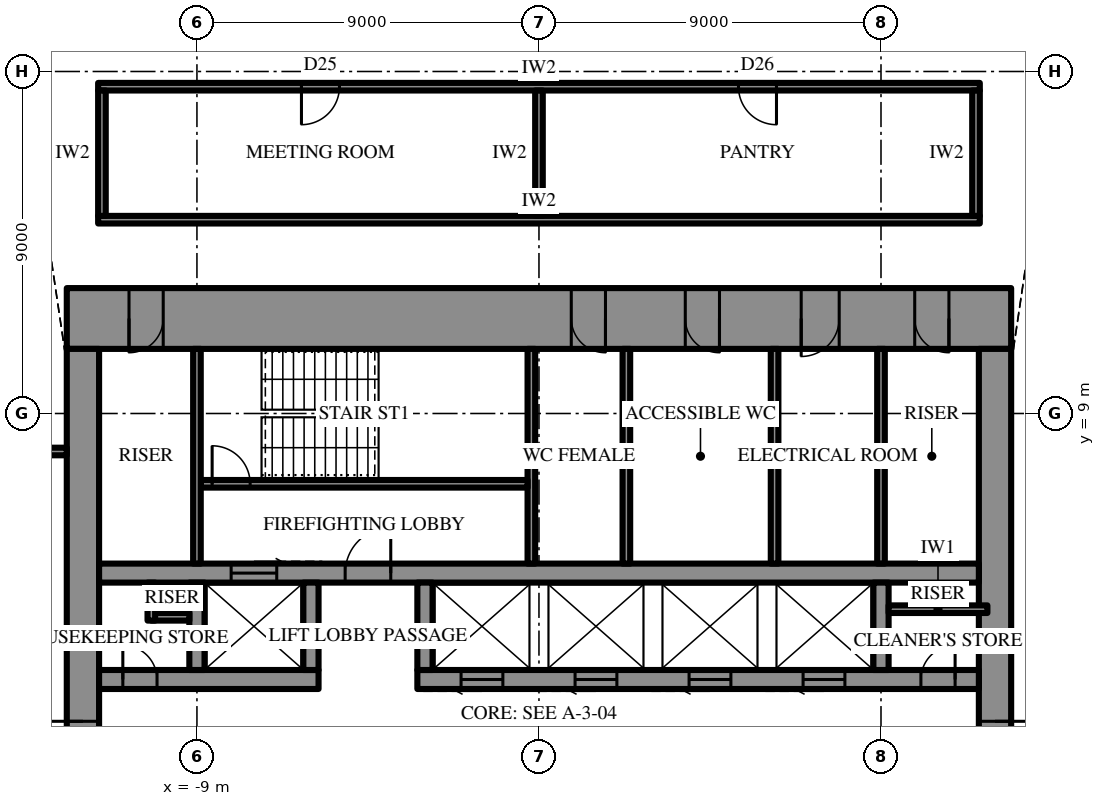
"""IFC4 building model, lengths in metres.
Left out: names, types, materials, properties, quantities, classifications, styles, units other than length and angle.
Written with IfcOpenShell. Run it as: python <this file> out.ifc"""

import sys

from ifc_helpers import new_model, si_unit, direction, frame, frame_2d, origin, place, context, subcontext, project, spatial, rectangle, extrude, element, fill, save


model = new_model("IFC4")
c1 = context("Model", 3, precision=1e-05, world=origin(), true_north=direction((0.0, 1.0)))
c2 = subcontext(c1, "Body", "Model", "MODEL_VIEW")
j1 = project(units=[si_unit("LENGTHUNIT", "METRE"), si_unit("PLANEANGLEUNIT", "RADIAN")], contexts=[c1])
p1 = place(None, origin())
s1 = spatial("IfcSite", under=j1, at=p1, CompositionType="ELEMENT")
p2 = place(p1, origin())
s2 = spatial("IfcBuilding", under=s1, at=p2, CompositionType="ELEMENT")
p3 = place(p2, frame((0.0, 0.0, 349.3)))
s3 = spatial("IfcBuildingStorey", under=s2, at=p3, CompositionType="ELEMENT", Elevation=349.3)
p4 = place(p3, frame((-12.425, 11.5, 0.0), z_axis=(0.0, 0.0, 1.0), x_axis=(1.0, 0.0, 0.0)))
e1 = element("IfcWall", 1, at=p4, inside=s3, PredefinedType="SHEAR", context=c2, shape_type="SweptSolid", body=[
    extrude(rectangle(XDim=24.85, YDim=1.6, at=frame_2d((12.425, 0.0))), origin(), (0.0, 0.0, 1.0), 4.2),
])
p5 = place(p4, frame((13.275, 0.0, 0.0)))
e2 = element("IfcOpeningElement", 2, at=p5, cuts=e1, PredefinedType="OPENING", context=c2, shape_type="SweptSolid", body=[
    extrude(rectangle(XDim=0.9, YDim=2.2, at=frame_2d((0.45, 1.1))), frame((0.0, 0.81, 0.0), z_axis=(0.0, -1.0, 0.0), x_axis=(1.0, 0.0, 0.0)), (0.0, 0.0, 1.0), 1.62),
])
p6 = place(p4, frame((16.275, 0.0, 0.0)))
e3 = element("IfcOpeningElement", 3, at=p6, cuts=e1, PredefinedType="OPENING", context=c2, shape_type="SweptSolid", body=[
    extrude(rectangle(XDim=0.9, YDim=2.2, at=frame_2d((0.45, 1.1))), frame((0.0, 0.81, 0.0), z_axis=(0.0, -1.0, 0.0), x_axis=(1.0, 0.0, 0.0)), (0.0, 0.0, 1.0), 1.62),
])
p7 = place(p4, frame((19.325, 0.0, 0.0)))
e4 = element("IfcOpeningElement", 4, at=p7, cuts=e1, PredefinedType="OPENING", context=c2, shape_type="SweptSolid", body=[
    extrude(rectangle(XDim=1.0, YDim=2.2, at=frame_2d((0.5, 1.1))), frame((0.0, 0.81, 0.0), z_axis=(0.0, -1.0, 0.0), x_axis=(1.0, 0.0, 0.0)), (0.0, 0.0, 1.0), 1.62),
])
p8 = place(p4, frame((1.637, 0.0, 0.0)))
e5 = element("IfcOpeningElement", 5, at=p8, cuts=e1, PredefinedType="OPENING", context=c2, shape_type="SweptSolid", body=[
    extrude(rectangle(XDim=0.9, YDim=2.2, at=frame_2d((0.45, 1.1))), frame((0.0, 0.81, 0.0), z_axis=(0.0, -1.0, 0.0), x_axis=(1.0, 0.0, 0.0)), (0.0, 0.0, 1.0), 1.62),
])
p9 = place(p4, frame((22.312, 0.0, 0.0)))
e6 = element("IfcOpeningElement", 6, at=p9, cuts=e1, PredefinedType="OPENING", context=c2, shape_type="SweptSolid", body=[
    extrude(rectangle(XDim=0.9, YDim=2.2, at=frame_2d((0.45, 1.1))), frame((0.0, 0.81, 0.0), z_axis=(0.0, -1.0, 0.0), x_axis=(1.0, 0.0, 0.0)), (0.0, 0.0, 1.0), 1.62),
])
p10 = place(p3, frame((12.0, -10.7, 0.0), z_axis=(0.0, 0.0, 1.0), x_axis=(0.0, 1.0, 0.0)))
e7 = element("IfcWall", 7, at=p10, inside=s3, PredefinedType="SHEAR", context=c2, shape_type="SweptSolid", body=[
    extrude(rectangle(XDim=21.4, YDim=0.85, at=frame_2d((10.7, 0.0))), origin(), (0.0, 0.0, 1.0), 4.2),
])
p11 = place(p10, frame((9.8, 0.0, 0.0)))
e8 = element("IfcOpeningElement", 8, at=p11, cuts=e7, PredefinedType="OPENING", context=c2, shape_type="SweptSolid", body=[
    extrude(rectangle(XDim=1.8, YDim=2.4, at=frame_2d((0.9, 1.2))), frame((0.0, 0.435, 0.0), z_axis=(0.0, -1.0, 0.0), x_axis=(1.0, 0.0, 0.0)), (0.0, 0.0, 1.0), 0.87),
])
p12 = place(p3, frame((-12.0, 10.7, 0.0), z_axis=(0.0, 0.0, 1.0), x_axis=(0.0, -1.0, 0.0)))
e9 = element("IfcWall", 9, at=p12, inside=s3, PredefinedType="SHEAR", context=c2, shape_type="SweptSolid", body=[
    extrude(rectangle(XDim=21.4, YDim=0.85, at=frame_2d((10.7, 0.0))), origin(), (0.0, 0.0, 1.0), 4.2),
])
p13 = place(p12, frame((9.8, 0.0, 0.0)))
e10 = element("IfcOpeningElement", 10, at=p13, cuts=e9, PredefinedType="OPENING", context=c2, shape_type="SweptSolid", body=[
    extrude(rectangle(XDim=1.8, YDim=2.4, at=frame_2d((0.9, 1.2))), frame((0.0, 0.435, 0.0), z_axis=(0.0, -1.0, 0.0), x_axis=(1.0, 0.0, 0.0)), (0.0, 0.0, 1.0), 0.87),
])
p14 = place(p3, frame((-11.575, 2.0, 0.0), z_axis=(0.0, 0.0, 1.0), x_axis=(1.0, 0.0, 0.0)))
e11 = element("IfcWall", 11, at=p14, inside=s3, PredefinedType="SHEAR", context=c2, shape_type="SweptSolid", body=[
    extrude(rectangle(XDim=5.775, YDim=0.5, at=frame_2d((2.887, 0.0))), origin(), (0.0, 0.0, 1.0), 4.2),
])
p15 = place(p14, frame((0.625, 0.0, 0.0)))
e12 = element("IfcOpeningElement", 12, at=p15, cuts=e11, PredefinedType="OPENING", context=c2, shape_type="SweptSolid", body=[
    extrude(rectangle(XDim=0.9, YDim=2.2, at=frame_2d((0.45, 1.1))), frame((0.0, 0.26, 0.0), z_axis=(0.0, -1.0, 0.0), x_axis=(1.0, 0.0, 0.0)), (0.0, 0.0, 1.0), 0.52),
])
p16 = place(p3, frame((-3.2, 2.0, 0.0), z_axis=(0.0, 0.0, 1.0), x_axis=(1.0, 0.0, 0.0)))
e13 = element("IfcWall", 13, at=p16, inside=s3, PredefinedType="SHEAR", context=c2, shape_type="SweptSolid", body=[
    extrude(rectangle(XDim=14.775, YDim=0.5, at=frame_2d((7.387, 0.0))), origin(), (0.0, 0.0, 1.0), 4.2),
])
p17 = place(p16, frame((13.25, 0.0, 0.0)))
e14 = element("IfcOpeningElement", 14, at=p17, cuts=e13, PredefinedType="OPENING", context=c2, shape_type="SweptSolid", body=[
    extrude(rectangle(XDim=0.9, YDim=2.2, at=frame_2d((0.45, 1.1))), frame((0.0, 0.26, 0.0), z_axis=(0.0, -1.0, 0.0), x_axis=(1.0, 0.0, 0.0)), (0.0, 0.0, 1.0), 0.52),
])
p18 = place(p16, frame((1.15, 0.0, 0.0)))
e15 = element("IfcOpeningElement", 15, at=p18, cuts=e13, PredefinedType="OPENING", context=c2, shape_type="SweptSolid", body=[
    extrude(rectangle(XDim=1.1, YDim=2.2, at=frame_2d((0.55, 1.1))), frame((0.0, 0.26, 0.0), z_axis=(0.0, -1.0, 0.0), x_axis=(1.0, 0.0, 0.0)), (0.0, 0.0, 1.0), 0.52),
])
p19 = place(p16, frame((4.15, 0.0, 0.0)))
e16 = element("IfcOpeningElement", 16, at=p19, cuts=e13, PredefinedType="OPENING", context=c2, shape_type="SweptSolid", body=[
    extrude(rectangle(XDim=1.1, YDim=2.2, at=frame_2d((0.55, 1.1))), frame((0.0, 0.26, 0.0), z_axis=(0.0, -1.0, 0.0), x_axis=(1.0, 0.0, 0.0)), (0.0, 0.0, 1.0), 0.52),
])
p20 = place(p16, frame((7.15, 0.0, 0.0)))
e17 = element("IfcOpeningElement", 17, at=p20, cuts=e13, PredefinedType="OPENING", context=c2, shape_type="SweptSolid", body=[
    extrude(rectangle(XDim=1.1, YDim=2.2, at=frame_2d((0.55, 1.1))), frame((0.0, 0.26, 0.0), z_axis=(0.0, -1.0, 0.0), x_axis=(1.0, 0.0, 0.0)), (0.0, 0.0, 1.0), 0.52),
])
p21 = place(p16, frame((10.15, 0.0, 0.0)))
e18 = element("IfcOpeningElement", 18, at=p21, cuts=e13, PredefinedType="OPENING", context=c2, shape_type="SweptSolid", body=[
    extrude(rectangle(XDim=1.1, YDim=2.2, at=frame_2d((0.55, 1.1))), frame((0.0, 0.26, 0.0), z_axis=(0.0, -1.0, 0.0), x_axis=(1.0, 0.0, 0.0)), (0.0, 0.0, 1.0), 0.52),
])
p22 = place(p3, frame((-11.575, 4.8, 0.0), z_axis=(0.0, 0.0, 1.0), x_axis=(1.0, 0.0, 0.0)))
e19 = element("IfcWall", 19, at=p22, inside=s3, PredefinedType="SHEAR", context=c2, shape_type="SweptSolid", body=[
    extrude(rectangle(XDim=23.15, YDim=0.5, at=frame_2d((11.575, 0.0))), origin(), (0.0, 0.0, 1.0), 4.2),
])
p23 = place(p22, frame((6.475, 0.0, 0.0)))
e20 = element("IfcOpeningElement", 20, at=p23, cuts=e19, PredefinedType="OPENING", context=c2, shape_type="SweptSolid", body=[
    extrude(rectangle(XDim=1.2, YDim=2.2, at=frame_2d((0.6, 1.1))), frame((0.0, 0.26, 0.0), z_axis=(0.0, -1.0, 0.0), x_axis=(1.0, 0.0, 0.0)), (0.0, 0.0, 1.0), 0.52),
])
p24 = place(p22, frame((3.475, 0.0, 0.0)))
e21 = element("IfcOpeningElement", 21, at=p24, cuts=e19, PredefinedType="OPENING", context=c2, shape_type="SweptSolid", body=[
    extrude(rectangle(XDim=1.2, YDim=2.2, at=frame_2d((0.6, 1.1))), frame((0.0, 0.26, 0.0), z_axis=(0.0, -1.0, 0.0), x_axis=(1.0, 0.0, 0.0)), (0.0, 0.0, 1.0), 0.52),
])
for number, where, z_axis, x_axis in (
    (22, (-9.0, 2.25, 0.0), (0.0, 0.0, 1.0), (0.0, 1.0, 0.0)),
    (23, (-6.0, 2.25, 0.0), (0.0, 0.0, 1.0), (0.0, 1.0, 0.0)),
    (24, (-3.0, 2.25, 0.0), (0.0, 0.0, 1.0), (0.0, 1.0, 0.0)),
    (25, (9.0, 2.25, 0.0), (0.0, 0.0, 1.0), (0.0, 1.0, 0.0)),
):
    element("IfcWall", number, at=place(p3, frame(where, z_axis=z_axis, x_axis=x_axis)), inside=s3, PredefinedType="SHEAR", context=c2, shape_type="SweptSolid", body=[
        extrude(rectangle(XDim=2.3, YDim=0.4, at=frame_2d((1.15, 0.0))), origin(), (0.0, 0.0, 1.0), 4.2),
    ])
p25 = place(p3, frame((-0.2, 5.05, 0.0), z_axis=(0.0, 0.0, 1.0), x_axis=(0.0, 1.0, 0.0)))
e26 = element("IfcWall", 26, at=p25, inside=s3, PredefinedType="SHEAR", context=c2, shape_type="SweptSolid", body=[
    extrude(rectangle(XDim=5.65, YDim=0.2, at=frame_2d((2.825, 0.0))), origin(), (0.0, 0.0, 1.0), 4.2),
])
p26 = place(p3, frame((-8.9, 7.15, 0.0), z_axis=(0.0, 0.0, 1.0), x_axis=(1.0, 0.0, 0.0)))
e27 = element("IfcWall", 27, at=p26, inside=s3, PredefinedType="SHEAR", context=c2, shape_type="SweptSolid", body=[
    extrude(rectangle(XDim=8.6, YDim=0.2, at=frame_2d((4.3, 0.0))), origin(), (0.0, 0.0, 1.0), 4.2),
])
p27 = place(p26, frame((0.3, 0.0, 0.0)))
e28 = element("IfcOpeningElement", 28, at=p27, cuts=e27, PredefinedType="OPENING", context=c2, shape_type="SweptSolid", body=[
    extrude(rectangle(XDim=1.0, YDim=2.2, at=frame_2d((0.5, 1.1))), frame((0.0, 0.11, 0.0), z_axis=(0.0, -1.0, 0.0), x_axis=(1.0, 0.0, 0.0)), (0.0, 0.0, 1.0), 0.22),
])
for number, where, z_axis, x_axis in (
    (29, (-9.0, 5.05, 0.0), (0.0, 0.0, 1.0), (0.0, 1.0, 0.0)),
    (30, (9.0, 5.05, 0.0), (0.0, 0.0, 1.0), (0.0, 1.0, 0.0)),
    (31, (2.3, 5.05, 0.0), (0.0, 0.0, 1.0), (0.0, 1.0, 0.0)),
    (32, (6.2, 5.05, 0.0), (0.0, 0.0, 1.0), (0.0, 1.0, 0.0)),
):
    element("IfcWall", number, at=place(p3, frame(where, z_axis=z_axis, x_axis=x_axis)), inside=s3, PredefinedType="PARTITIONING", context=c2, shape_type="SweptSolid", body=[
        extrude(rectangle(XDim=5.65, YDim=0.2, at=frame_2d((2.825, 0.0))), origin(), (0.0, 0.0, 1.0), 4.0),
    ])
for number, where, z_axis, x_axis in (
    (33, (-10.2, 3.65, 0.0), (0.0, 0.0, 1.0), (1.0, 0.0, 0.0)),
    (34, (-10.2, 3.55, 0.0), (0.0, 0.0, 1.0), (0.0, 1.0, 0.0)),
):
    element("IfcWall", number, at=place(p3, frame(where, z_axis=z_axis, x_axis=x_axis)), inside=s3, PredefinedType="PARTITIONING", context=c2, shape_type="SweptSolid", body=[
        extrude(rectangle(XDim=1.0, YDim=0.2, at=frame_2d((0.5, 0.0))), origin(), (0.0, 0.0, 1.0), 4.0),
    ])
p28 = place(p3, frame((9.2, 3.85, 0.0), z_axis=(0.0, 0.0, 1.0), x_axis=(1.0, 0.0, 0.0)))
e35 = element("IfcWall", 35, at=p28, inside=s3, PredefinedType="PARTITIONING", context=c2, shape_type="SweptSolid", body=[
    extrude(rectangle(XDim=2.6, YDim=0.2, at=frame_2d((1.3, 0.0))), origin(), (0.0, 0.0, 1.0), 4.0),
])
p29 = place(p3, frame((-11.6, 14.1, 0.0), z_axis=(0.0, 0.0, 1.0), x_axis=(1.0, 0.0, 0.0)))
e36 = element("IfcWall", 36, at=p29, inside=s3, PredefinedType="PARTITIONING", context=c2, shape_type="SweptSolid", body=[
    extrude(rectangle(XDim=23.2, YDim=0.2, at=frame_2d((11.6, 0.0))), origin(), (0.0, 0.0, 1.0), 4.0),
])
p30 = place(p3, frame((-11.6, 17.6, 0.0), z_axis=(0.0, 0.0, 1.0), x_axis=(1.0, 0.0, 0.0)))
e37 = element("IfcWall", 37, at=p30, inside=s3, PredefinedType="PARTITIONING", context=c2, shape_type="SweptSolid", body=[
    extrude(rectangle(XDim=23.2, YDim=0.2, at=frame_2d((11.6, 0.0))), origin(), (0.0, 0.0, 1.0), 4.0),
])
p31 = place(p30, frame((5.35, 0.0, 0.0)))
e38 = element("IfcOpeningElement", 38, at=p31, cuts=e37, PredefinedType="OPENING", context=c2, shape_type="SweptSolid", body=[
    extrude(rectangle(XDim=1.0, YDim=2.2, at=frame_2d((0.5, 1.1))), frame((0.0, 0.11, 0.0), z_axis=(0.0, -1.0, 0.0), x_axis=(1.0, 0.0, 0.0)), (0.0, 0.0, 1.0), 0.22),
])
p32 = place(p30, frame((16.85, 0.0, 0.0)))
e39 = element("IfcOpeningElement", 39, at=p32, cuts=e37, PredefinedType="OPENING", context=c2, shape_type="SweptSolid", body=[
    extrude(rectangle(XDim=1.0, YDim=2.2, at=frame_2d((0.5, 1.1))), frame((0.0, 0.11, 0.0), z_axis=(0.0, -1.0, 0.0), x_axis=(1.0, 0.0, 0.0)), (0.0, 0.0, 1.0), 0.22),
])
p33 = place(p3, frame((-11.5, 14.2, 0.0), z_axis=(0.0, 0.0, 1.0), x_axis=(0.0, 1.0, 0.0)))
e40 = element("IfcWall", 40, at=p33, inside=s3, PredefinedType="PARTITIONING", context=c2, shape_type="SweptSolid", body=[
    extrude(rectangle(XDim=3.3, YDim=0.2, at=frame_2d((1.65, 0.0))), origin(), (0.0, 0.0, 1.0), 4.0),
])
p34 = place(p3, frame((0.0, 14.2, 0.0), z_axis=(0.0, 0.0, 1.0), x_axis=(0.0, 1.0, 0.0)))
e41 = element("IfcWall", 41, at=p34, inside=s3, PredefinedType="PARTITIONING", context=c2, shape_type="SweptSolid", body=[
    extrude(rectangle(XDim=3.3, YDim=0.2, at=frame_2d((1.65, 0.0))), origin(), (0.0, 0.0, 1.0), 2.992),
])
p35 = place(p3, frame((11.5, 14.2, 0.0), z_axis=(0.0, 0.0, 1.0), x_axis=(0.0, 1.0, 0.0)))
e42 = element("IfcWall", 42, at=p35, inside=s3, PredefinedType="PARTITIONING", context=c2, shape_type="SweptSolid", body=[
    extrude(rectangle(XDim=3.3, YDim=0.2, at=frame_2d((1.65, 0.0))), origin(), (0.0, 0.0, 1.0), 4.0),
])
p36 = place(p3, frame((-12.425, 8.0, 0.0), z_axis=(0.0, 0.0, 1.0), x_axis=(-1.0, 0.0, 0.0)))
e43 = element("IfcWall", 43, at=p36, inside=s3, PredefinedType="PARTITIONING", context=c2, shape_type="SweptSolid", body=[
    extrude(rectangle(XDim=13.59, YDim=0.2, at=frame_2d((6.795, 0.0))), origin(), (0.0, 0.0, 1.0), 4.0),
])
p37 = place(p36, frame((0.859, 0.0, 0.0)))
e44 = element("IfcOpeningElement", 44, at=p37, cuts=e43, PredefinedType="OPENING", context=c2, shape_type="SweptSolid", body=[
    extrude(rectangle(XDim=1.0, YDim=2.2, at=frame_2d((0.5, 1.1))), frame((0.0, 0.11, 0.0), z_axis=(0.0, -1.0, 0.0), x_axis=(1.0, 0.0, 0.0)), (0.0, 0.0, 1.0), 0.22),
])
p38 = place(p11, frame((1.8, 0.0, 0.0), z_axis=(0.0, 0.0, 1.0), x_axis=(-1.0, 0.0, 0.0)))
e45 = element("IfcDoor", 45, at=p38, inside=s3, OperationType="DOUBLE_DOOR_SINGLE_SWING", PredefinedType="DOOR", context=c2, shape_type="SweptSolid", body=[
    extrude(rectangle(XDim=1.8, YDim=2.4, at=frame_2d((0.9, 1.2))), frame((0.0, 0.025, 0.0), z_axis=(0.0, -1.0, 0.0), x_axis=(1.0, 0.0, 0.0)), (0.0, 0.0, 1.0), 0.05),
])
fill(e8, e45)
p39 = place(p13, frame((1.8, 0.0, 0.0), z_axis=(0.0, 0.0, 1.0), x_axis=(-1.0, 0.0, 0.0)))
e46 = element("IfcDoor", 46, at=p39, inside=s3, OperationType="DOUBLE_DOOR_SINGLE_SWING", PredefinedType="DOOR", context=c2, shape_type="SweptSolid", body=[
    extrude(rectangle(XDim=1.8, YDim=2.4, at=frame_2d((0.9, 1.2))), frame((0.0, 0.025, 0.0), z_axis=(0.0, -1.0, 0.0), x_axis=(1.0, 0.0, 0.0)), (0.0, 0.0, 1.0), 0.05),
])
fill(e10, e46)
p40 = place(p23, origin())
e47 = element("IfcDoor", 47, at=p40, inside=s3, OperationType="SINGLE_SWING_LEFT", PredefinedType="DOOR", context=c2, shape_type="SweptSolid", body=[
    extrude(rectangle(XDim=1.2, YDim=2.2, at=frame_2d((0.6, 1.1))), frame((0.0, 0.025, 0.0), z_axis=(0.0, -1.0, 0.0), x_axis=(1.0, 0.0, 0.0)), (0.0, 0.0, 1.0), 0.05),
])
fill(e20, e47)
p41 = place(p27, origin())
e48 = element("IfcDoor", 48, at=p41, inside=s3, OperationType="SINGLE_SWING_RIGHT", PredefinedType="DOOR", context=c2, shape_type="SweptSolid", body=[
    extrude(rectangle(XDim=1.0, YDim=2.2, at=frame_2d((0.5, 1.1))), frame((0.0, 0.025, 0.0), z_axis=(0.0, -1.0, 0.0), x_axis=(1.0, 0.0, 0.0)), (0.0, 0.0, 1.0), 0.05),
])
fill(e28, e48)
p42 = place(p5, frame((0.9, 0.0, 0.0), z_axis=(0.0, 0.0, 1.0), x_axis=(-1.0, 0.0, 0.0)))
e49 = element("IfcDoor", 49, at=p42, inside=s3, OperationType="SINGLE_SWING_RIGHT", PredefinedType="DOOR", context=c2, shape_type="SweptSolid", body=[
    extrude(rectangle(XDim=0.9, YDim=2.2, at=frame_2d((0.45, 1.1))), frame((0.0, 0.025, 0.0), z_axis=(0.0, -1.0, 0.0), x_axis=(1.0, 0.0, 0.0)), (0.0, 0.0, 1.0), 0.05),
])
fill(e2, e49)
p43 = place(p6, frame((0.9, 0.0, 0.0), z_axis=(0.0, 0.0, 1.0), x_axis=(-1.0, 0.0, 0.0)))
e50 = element("IfcDoor", 50, at=p43, inside=s3, OperationType="SINGLE_SWING_RIGHT", PredefinedType="DOOR", context=c2, shape_type="SweptSolid", body=[
    extrude(rectangle(XDim=0.9, YDim=2.2, at=frame_2d((0.45, 1.1))), frame((0.0, 0.025, 0.0), z_axis=(0.0, -1.0, 0.0), x_axis=(1.0, 0.0, 0.0)), (0.0, 0.0, 1.0), 0.05),
])
fill(e3, e50)
p44 = place(p7, frame((1.0, 0.0, 0.0), z_axis=(0.0, 0.0, 1.0), x_axis=(-1.0, 0.0, 0.0)))
e51 = element("IfcDoor", 51, at=p44, inside=s3, OperationType="SINGLE_SWING_LEFT", PredefinedType="DOOR", context=c2, shape_type="SweptSolid", body=[
    extrude(rectangle(XDim=1.0, YDim=2.2, at=frame_2d((0.5, 1.1))), frame((0.0, 0.025, 0.0), z_axis=(0.0, -1.0, 0.0), x_axis=(1.0, 0.0, 0.0)), (0.0, 0.0, 1.0), 0.05),
])
fill(e4, e51)
p45 = place(p8, frame((0.9, 0.0, 0.0), z_axis=(0.0, 0.0, 1.0), x_axis=(-1.0, 0.0, 0.0)))
e52 = element("IfcDoor", 52, at=p45, inside=s3, OperationType="SINGLE_SWING_LEFT", PredefinedType="DOOR", context=c2, shape_type="SweptSolid", body=[
    extrude(rectangle(XDim=0.9, YDim=2.2, at=frame_2d((0.45, 1.1))), frame((0.0, 0.025, 0.0), z_axis=(0.0, -1.0, 0.0), x_axis=(1.0, 0.0, 0.0)), (0.0, 0.0, 1.0), 0.05),
])
fill(e5, e52)
p46 = place(p9, frame((0.9, 0.0, 0.0), z_axis=(0.0, 0.0, 1.0), x_axis=(-1.0, 0.0, 0.0)))
e53 = element("IfcDoor", 53, at=p46, inside=s3, OperationType="SINGLE_SWING_RIGHT", PredefinedType="DOOR", context=c2, shape_type="SweptSolid", body=[
    extrude(rectangle(XDim=0.9, YDim=2.2, at=frame_2d((0.45, 1.1))), frame((0.0, 0.025, 0.0), z_axis=(0.0, -1.0, 0.0), x_axis=(1.0, 0.0, 0.0)), (0.0, 0.0, 1.0), 0.05),
])
fill(e6, e53)
p47 = place(p15, origin())
e54 = element("IfcDoor", 54, at=p47, inside=s3, OperationType="SINGLE_SWING_RIGHT", PredefinedType="DOOR", context=c2, shape_type="SweptSolid", body=[
    extrude(rectangle(XDim=0.9, YDim=2.2, at=frame_2d((0.45, 1.1))), frame((0.0, 0.025, 0.0), z_axis=(0.0, -1.0, 0.0), x_axis=(1.0, 0.0, 0.0)), (0.0, 0.0, 1.0), 0.05),
])
fill(e12, e54)
p48 = place(p17, origin())
e55 = element("IfcDoor", 55, at=p48, inside=s3, OperationType="SINGLE_SWING_LEFT", PredefinedType="DOOR", context=c2, shape_type="SweptSolid", body=[
    extrude(rectangle(XDim=0.9, YDim=2.2, at=frame_2d((0.45, 1.1))), frame((0.0, 0.025, 0.0), z_axis=(0.0, -1.0, 0.0), x_axis=(1.0, 0.0, 0.0)), (0.0, 0.0, 1.0), 0.05),
])
fill(e14, e55)
p49 = place(p24, origin())
e56 = element("IfcDoor", 56, at=p49, inside=s3, OperationType="SLIDING_TO_LEFT", PredefinedType="DOOR", context=c2, shape_type="SweptSolid", body=[
    extrude(rectangle(XDim=1.2, YDim=2.2, at=frame_2d((0.6, 1.1))), frame((0.0, 0.025, 0.0), z_axis=(0.0, -1.0, 0.0), x_axis=(1.0, 0.0, 0.0)), (0.0, 0.0, 1.0), 0.05),
])
fill(e21, e56)
p50 = place(p18, frame((1.1, 0.0, 0.0), z_axis=(0.0, 0.0, 1.0), x_axis=(-1.0, 0.0, 0.0)))
e57 = element("IfcDoor", 57, at=p50, inside=s3, OperationType="SLIDING_TO_LEFT", PredefinedType="DOOR", context=c2, shape_type="SweptSolid", body=[
    extrude(rectangle(XDim=1.1, YDim=2.2, at=frame_2d((0.55, 1.1))), frame((0.0, 0.025, 0.0), z_axis=(0.0, -1.0, 0.0), x_axis=(1.0, 0.0, 0.0)), (0.0, 0.0, 1.0), 0.05),
])
fill(e15, e57)
p51 = place(p19, frame((1.1, 0.0, 0.0), z_axis=(0.0, 0.0, 1.0), x_axis=(-1.0, 0.0, 0.0)))
e58 = element("IfcDoor", 58, at=p51, inside=s3, OperationType="SLIDING_TO_LEFT", PredefinedType="DOOR", context=c2, shape_type="SweptSolid", body=[
    extrude(rectangle(XDim=1.1, YDim=2.2, at=frame_2d((0.55, 1.1))), frame((0.0, 0.025, 0.0), z_axis=(0.0, -1.0, 0.0), x_axis=(1.0, 0.0, 0.0)), (0.0, 0.0, 1.0), 0.05),
])
fill(e16, e58)
p52 = place(p20, frame((1.1, 0.0, 0.0), z_axis=(0.0, 0.0, 1.0), x_axis=(-1.0, 0.0, 0.0)))
e59 = element("IfcDoor", 59, at=p52, inside=s3, OperationType="SLIDING_TO_LEFT", PredefinedType="DOOR", context=c2, shape_type="SweptSolid", body=[
    extrude(rectangle(XDim=1.1, YDim=2.2, at=frame_2d((0.55, 1.1))), frame((0.0, 0.025, 0.0), z_axis=(0.0, -1.0, 0.0), x_axis=(1.0, 0.0, 0.0)), (0.0, 0.0, 1.0), 0.05),
])
fill(e17, e59)
p53 = place(p21, frame((1.1, 0.0, 0.0), z_axis=(0.0, 0.0, 1.0), x_axis=(-1.0, 0.0, 0.0)))
e60 = element("IfcDoor", 60, at=p53, inside=s3, OperationType="SLIDING_TO_LEFT", PredefinedType="DOOR", context=c2, shape_type="SweptSolid", body=[
    extrude(rectangle(XDim=1.1, YDim=2.2, at=frame_2d((0.55, 1.1))), frame((0.0, 0.025, 0.0), z_axis=(0.0, -1.0, 0.0), x_axis=(1.0, 0.0, 0.0)), (0.0, 0.0, 1.0), 0.05),
])
fill(e18, e60)
p54 = place(p31, frame((1.0, 0.0, 0.0), z_axis=(0.0, 0.0, 1.0), x_axis=(-1.0, 0.0, 0.0)))
e61 = element("IfcDoor", 61, at=p54, inside=s3, OperationType="SINGLE_SWING_LEFT", PredefinedType="DOOR", context=c2, shape_type="SweptSolid", body=[
    extrude(rectangle(XDim=1.0, YDim=2.2, at=frame_2d((0.5, 1.1))), frame((0.0, 0.025, 0.0), z_axis=(0.0, -1.0, 0.0), x_axis=(1.0, 0.0, 0.0)), (0.0, 0.0, 1.0), 0.05),
])
fill(e38, e61)
p55 = place(p32, frame((1.0, 0.0, 0.0), z_axis=(0.0, 0.0, 1.0), x_axis=(-1.0, 0.0, 0.0)))
e62 = element("IfcDoor", 62, at=p55, inside=s3, OperationType="SINGLE_SWING_RIGHT", PredefinedType="DOOR", context=c2, shape_type="SweptSolid", body=[
    extrude(rectangle(XDim=1.0, YDim=2.2, at=frame_2d((0.5, 1.1))), frame((0.0, 0.025, 0.0), z_axis=(0.0, -1.0, 0.0), x_axis=(1.0, 0.0, 0.0)), (0.0, 0.0, 1.0), 0.05),
])
fill(e39, e62)
save(model, sys.argv[1])
